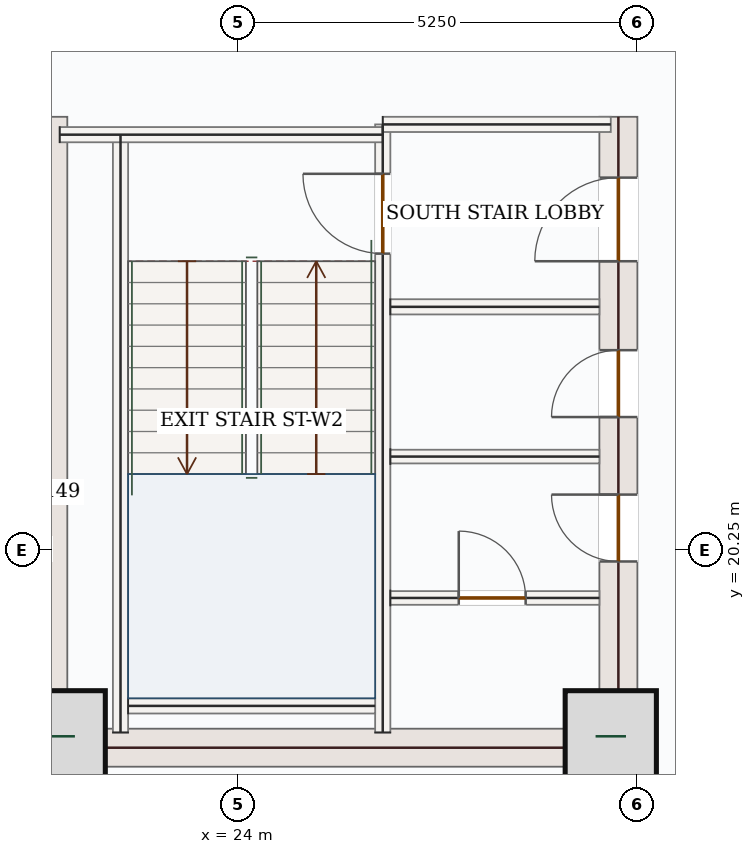
"""IFC4 building model, lengths in metres.
Left out: names, types, materials, properties, quantities, classifications, styles, units other than length and angle.
Written with IfcOpenShell. Run it as: python <this file> out.ifc"""

import sys

from ifc_helpers import new_model, si_unit, direction, frame, frame_2d, origin, origin_2d, place, context, subcontext, project, spatial, rectangle, extrude, source, transform, mapped, element, fill, save


model = new_model("IFC4")
c1 = context("Model", 3, precision=1e-05, world=origin(), true_north=direction((0.0, 1.0)))
c2 = subcontext(c1, "Body", "Model", "MODEL_VIEW")
j1 = project(units=[si_unit("LENGTHUNIT", "METRE"), si_unit("PLANEANGLEUNIT", "RADIAN")], contexts=[c1])
p1 = place(None, origin())
s1 = spatial("IfcSite", under=j1, at=p1, CompositionType="ELEMENT")
p2 = place(p1, origin())
s2 = spatial("IfcBuilding", under=s1, at=p2, CompositionType="ELEMENT")
p3 = place(p2, frame((0.0, 0.0, 209.7)))
s3 = spatial("IfcBuildingStorey", under=s2, at=p3, CompositionType="ELEMENT", Elevation=209.7)
m1 = source(origin(), c2, "Body", "SweptSolid", [
    extrude(rectangle(XDim=8.55, YDim=0.5, at=frame_2d((4.275, 0.0))), origin(), (0.0, 0.0, 1.0), 3.62),
])
p4 = place(p3, frame((21.5, 17.4, 0.0), z_axis=(0.0, 0.0, 1.0), x_axis=(0.0, 1.0, 0.0)))
e1 = element("IfcWall", 1, at=p4, inside=s3, PredefinedType="SHEAR", context=c2, shape_type="MappedRepresentation", body=[
    mapped(m1, transform((0.0, 0.0, 0.0), x_axis=(1.0, 0.0, 0.0), y_axis=(0.0, 1.0, 0.0), z_axis=(0.0, 0.0, 1.0), scale=1.0)),
])
p5 = place(p3, frame((29.0, 17.4, 0.0), z_axis=(0.0, 0.0, 1.0), x_axis=(0.0, 1.0, 0.0)))
e2 = element("IfcWall", 2, at=p5, inside=s3, PredefinedType="SHEAR", context=c2, shape_type="SweptSolid", body=[
    extrude(rectangle(XDim=8.55, YDim=0.5, at=frame_2d((4.275, 0.0))), origin(), (0.0, 0.0, 1.0), 3.62),
])
p6 = place(p5, frame((6.65, 0.0, 0.0)))
e3 = element("IfcOpeningElement", 3, at=p6, cuts=e2, PredefinedType="OPENING", context=c2, shape_type="SweptSolid", body=[
    extrude(rectangle(XDim=1.1, YDim=2.2, at=frame_2d((0.55, 1.1))), frame((0.0, 0.26, 0.0), z_axis=(0.0, -1.0, 0.0), x_axis=(1.0, 0.0, 0.0)), (0.0, 0.0, 1.0), 0.52),
])
p7 = place(p5, frame((2.7, 0.0, 0.0)))
e4 = element("IfcOpeningElement", 4, at=p7, cuts=e2, PredefinedType="OPENING", context=c2, shape_type="SweptSolid", body=[
    extrude(rectangle(XDim=0.88, YDim=2.1, at=frame_2d((0.44, 1.05))), frame((0.0, 0.26, 0.0), z_axis=(0.0, -1.0, 0.0), x_axis=(1.0, 0.0, 0.0)), (0.0, 0.0, 1.0), 0.52),
])
p8 = place(p5, frame((4.6, 0.0, 0.0)))
e5 = element("IfcOpeningElement", 5, at=p8, cuts=e2, PredefinedType="OPENING", context=c2, shape_type="SweptSolid", body=[
    extrude(rectangle(XDim=0.88, YDim=2.1, at=frame_2d((0.44, 1.05))), frame((0.0, 0.26, 0.0), z_axis=(0.0, -1.0, 0.0), x_axis=(1.0, 0.0, 0.0)), (0.0, 0.0, 1.0), 0.52),
])
m2 = source(origin(), c2, "Body", "SweptSolid", [
    extrude(rectangle(XDim=7.0, YDim=0.5, at=frame_2d((3.5, 0.0))), origin(), (0.0, 0.0, 1.0), 3.62),
])
p9 = place(p3, frame((21.75, 17.65, 0.0), z_axis=(0.0, 0.0, 1.0), x_axis=(1.0, 0.0, 0.0)))
e6 = element("IfcWall", 6, at=p9, inside=s3, PredefinedType="SHEAR", context=c2, shape_type="MappedRepresentation", body=[
    mapped(m2, transform((0.0, 0.0, 0.0), x_axis=(1.0, 0.0, 0.0), y_axis=(0.0, 1.0, 0.0), z_axis=(0.0, 0.0, 1.0), scale=1.0)),
])
m3 = source(origin(), c2, "Body", "SweptSolid", [
    extrude(rectangle(XDim=1.2, YDim=1.2, at=origin_2d()), origin(), (0.0, 0.0, 1.0), 3.9),
])
for number, where, z_axis, x_axis in (
    (7, (21.65, 17.8, 0.0), (0.0, 0.0, 1.0), (1.0, 0.0, 0.0)),
    (8, (28.9, 17.8, 0.0), (0.0, 0.0, 1.0), (1.0, 0.0, 0.0)),
):
    element("IfcColumn", number, at=place(p3, frame(where, z_axis=z_axis, x_axis=x_axis)), inside=s3, PredefinedType="COLUMN", context=c2, shape_type="MappedRepresentation", body=[
        mapped(m3, transform((0.0, 0.0, 0.0), x_axis=(1.0, 0.0, 0.0), y_axis=(0.0, 1.0, 0.0), z_axis=(0.0, 0.0, 1.0), scale=1.0)),
    ])
m4 = source(origin(), c2, "Body", "SweptSolid", [
    extrude(rectangle(XDim=7.87, YDim=0.2, at=frame_2d((3.935, 0.0))), origin(), (0.0, 0.0, 1.0), 3.62),
])
p10 = place(p3, frame((22.45, 17.85, 0.0), z_axis=(0.0, 0.0, 1.0), x_axis=(0.0, 1.0, 0.0)))
e9 = element("IfcWall", 9, at=p10, inside=s3, PredefinedType="SOLIDWALL", context=c2, shape_type="MappedRepresentation", body=[
    mapped(m4, transform((0.0, 0.0, 0.0), x_axis=(1.0, 0.0, 0.0), y_axis=(0.0, 1.0, 0.0), z_axis=(0.0, 0.0, 1.0), scale=1.0)),
])
p11 = place(p3, frame((25.9, 17.85, 0.0), z_axis=(0.0, 0.0, 1.0), x_axis=(0.0, 1.0, 0.0)))
e10 = element("IfcWall", 10, at=p11, inside=s3, PredefinedType="SOLIDWALL", context=c2, shape_type="SweptSolid", body=[
    extrude(rectangle(XDim=8.0, YDim=0.2, at=frame_2d((4.0, 0.0))), origin(), (0.0, 0.0, 1.0), 3.62),
])
p12 = place(p11, frame((6.3, 0.0, 0.0)))
e11 = element("IfcOpeningElement", 11, at=p12, cuts=e10, PredefinedType="OPENING", context=c2, shape_type="SweptSolid", body=[
    extrude(rectangle(XDim=1.05, YDim=2.15, at=frame_2d((0.525, 1.075))), frame((0.0, 0.11, 0.0), z_axis=(0.0, -1.0, 0.0), x_axis=(1.0, 0.0, 0.0)), (0.0, 0.0, 1.0), 0.22),
])
m5 = source(origin(), c2, "Body", "SweptSolid", [
    extrude(rectangle(XDim=4.25, YDim=0.2, at=frame_2d((2.125, 0.0))), origin(), (0.0, 0.0, 1.0), 3.62),
])
p13 = place(p3, frame((21.65, 25.715, 0.0), z_axis=(0.0, 0.0, 1.0), x_axis=(1.0, 0.0, 0.0)))
e12 = element("IfcWall", 12, at=p13, inside=s3, PredefinedType="SOLIDWALL", context=c2, shape_type="MappedRepresentation", body=[
    mapped(m5, transform((0.0, 0.0, 0.0), x_axis=(1.0, 0.0, 0.0), y_axis=(0.0, 1.0, 0.0), z_axis=(0.0, 0.0, 1.0), scale=1.0)),
])
m6 = source(origin(), c2, "Body", "SweptSolid", [
    extrude(rectangle(XDim=3.0, YDim=0.2, at=frame_2d((1.5, 0.0))), origin(), (0.0, 0.0, 1.0), 3.62),
])
p14 = place(p3, frame((25.9, 25.85, 0.0), z_axis=(0.0, 0.0, 1.0), x_axis=(1.0, 0.0, 0.0)))
e13 = element("IfcWall", 13, at=p14, inside=s3, PredefinedType="SOLIDWALL", context=c2, shape_type="MappedRepresentation", body=[
    mapped(m6, transform((0.0, 0.0, 0.0), x_axis=(1.0, 0.0, 0.0), y_axis=(0.0, 1.0, 0.0), z_axis=(0.0, 0.0, 1.0), scale=1.0)),
])
m7 = source(origin(), c2, "Body", "SweptSolid", [
    extrude(rectangle(XDim=3.25, YDim=0.2, at=frame_2d((1.625, 0.0))), origin(), (0.0, 0.0, 1.0), 3.62),
])
p15 = place(p3, frame((22.55, 18.2, 0.0), z_axis=(0.0, 0.0, 1.0), x_axis=(1.0, 0.0, 0.0)))
e14 = element("IfcWall", 14, at=p15, inside=s3, PredefinedType="SOLIDWALL", context=c2, shape_type="MappedRepresentation", body=[
    mapped(m7, transform((0.0, 0.0, 0.0), x_axis=(1.0, 0.0, 0.0), y_axis=(0.0, 1.0, 0.0), z_axis=(0.0, 0.0, 1.0), scale=1.0)),
])
m8 = source(origin(), c2, "Body", "SweptSolid", [
    extrude(rectangle(XDim=2.75, YDim=0.2, at=frame_2d((1.375, 0.0))), origin(), (0.0, 0.0, 1.0), 3.62),
])
p16 = place(p3, frame((26.0, 23.45, 0.0), z_axis=(0.0, 0.0, 1.0), x_axis=(1.0, 0.0, 0.0)))
e15 = element("IfcWall", 15, at=p16, inside=s3, PredefinedType="SOLIDWALL", context=c2, shape_type="MappedRepresentation", body=[
    mapped(m8, transform((0.0, 0.0, 0.0), x_axis=(1.0, 0.0, 0.0), y_axis=(0.0, 1.0, 0.0), z_axis=(0.0, 0.0, 1.0), scale=1.0)),
])
p17 = place(p3, frame((26.0, 19.62, 0.0), z_axis=(0.0, 0.0, 1.0), x_axis=(1.0, 0.0, 0.0)))
e16 = element("IfcWall", 16, at=p17, inside=s3, PredefinedType="PARTITIONING", context=c2, shape_type="SweptSolid", body=[
    extrude(rectangle(XDim=2.75, YDim=0.18, at=frame_2d((1.375, 0.0))), origin(), (0.0, 0.0, 1.0), 3.62),
])
p18 = place(p17, frame((0.9, 0.0, 0.0)))
e17 = element("IfcOpeningElement", 17, at=p18, cuts=e16, PredefinedType="OPENING", context=c2, shape_type="SweptSolid", body=[
    extrude(rectangle(XDim=0.88, YDim=2.1, at=frame_2d((0.44, 1.05))), frame((0.0, 0.1, 0.0), z_axis=(0.0, -1.0, 0.0), x_axis=(1.0, 0.0, 0.0)), (0.0, 0.0, 1.0), 0.2),
])
m9 = source(origin(), c2, "Body", "SweptSolid", [
    extrude(rectangle(XDim=2.75, YDim=0.18, at=frame_2d((1.375, 0.0))), origin(), (0.0, 0.0, 1.0), 3.62),
])
p19 = place(p3, frame((26.0, 21.48, 0.0), z_axis=(0.0, 0.0, 1.0), x_axis=(1.0, 0.0, 0.0)))
e18 = element("IfcWall", 18, at=p19, inside=s3, PredefinedType="PARTITIONING", context=c2, shape_type="MappedRepresentation", body=[
    mapped(m9, transform((0.0, 0.0, 0.0), x_axis=(1.0, 0.0, 0.0), y_axis=(0.0, 1.0, 0.0), z_axis=(0.0, 0.0, 1.0), scale=1.0)),
])
m10 = source(origin(), c2, "Body", "SweptSolid", [
    extrude(rectangle(XDim=1.05, YDim=2.15, at=frame_2d((0.525, 1.075))), frame((0.0, 0.025, 0.0), z_axis=(0.0, -1.0, 0.0), x_axis=(1.0, 0.0, 0.0)), (0.0, 0.0, 1.0), 0.05),
])
p20 = place(p12, origin())
e19 = element("IfcDoor", 19, at=p20, inside=s3, OperationType="SINGLE_SWING_RIGHT", PredefinedType="DOOR", context=c2, shape_type="MappedRepresentation", body=[
    mapped(m10, transform((0.0, 0.0, 0.0), x_axis=(1.0, 0.0, 0.0), y_axis=(0.0, 1.0, 0.0), z_axis=(0.0, 0.0, 1.0), scale=1.0)),
])
fill(e11, e19)
m11 = source(origin(), c2, "Body", "SweptSolid", [
    extrude(rectangle(XDim=1.1, YDim=2.2, at=frame_2d((0.55, 1.1))), frame((0.0, 0.025, 0.0), z_axis=(0.0, -1.0, 0.0), x_axis=(1.0, 0.0, 0.0)), (0.0, 0.0, 1.0), 0.05),
])
p21 = place(p6, origin())
e20 = element("IfcDoor", 20, at=p21, inside=s3, OperationType="SINGLE_SWING_LEFT", PredefinedType="DOOR", context=c2, shape_type="MappedRepresentation", body=[
    mapped(m11, transform((0.0, 0.0, 0.0), x_axis=(1.0, 0.0, 0.0), y_axis=(0.0, 1.0, 0.0), z_axis=(0.0, 0.0, 1.0), scale=1.0)),
])
fill(e3, e20)
m12 = source(origin(), c2, "Body", "SweptSolid", [
    extrude(rectangle(XDim=0.88, YDim=2.1, at=frame_2d((0.44, 1.05))), frame((0.0, 0.025, 0.0), z_axis=(0.0, -1.0, 0.0), x_axis=(1.0, 0.0, 0.0)), (0.0, 0.0, 1.0), 0.05),
])
p22 = place(p18, origin())
e21 = element("IfcDoor", 21, at=p22, inside=s3, OperationType="SINGLE_SWING_LEFT", PredefinedType="DOOR", context=c2, shape_type="MappedRepresentation", body=[
    mapped(m12, transform((0.0, 0.0, 0.0), x_axis=(1.0, 0.0, 0.0), y_axis=(0.0, 1.0, 0.0), z_axis=(0.0, 0.0, 1.0), scale=1.0)),
])
fill(e17, e21)
p23 = place(p7, origin())
e22 = element("IfcDoor", 22, at=p23, inside=s3, OperationType="SINGLE_SWING_RIGHT", PredefinedType="DOOR", context=c2, shape_type="MappedRepresentation", body=[
    mapped(m12, transform((0.0, 0.0, 0.0), x_axis=(1.0, 0.0, 0.0), y_axis=(0.0, 1.0, 0.0), z_axis=(0.0, 0.0, 1.0), scale=1.0)),
])
fill(e4, e22)
p24 = place(p8, origin())
e23 = element("IfcDoor", 23, at=p24, inside=s3, OperationType="SINGLE_SWING_LEFT", PredefinedType="DOOR", context=c2, shape_type="MappedRepresentation", body=[
    mapped(m12, transform((0.0, 0.0, 0.0), x_axis=(1.0, 0.0, 0.0), y_axis=(0.0, 1.0, 0.0), z_axis=(0.0, 0.0, 1.0), scale=1.0)),
])
fill(e5, e23)
save(model, sys.argv[1])
